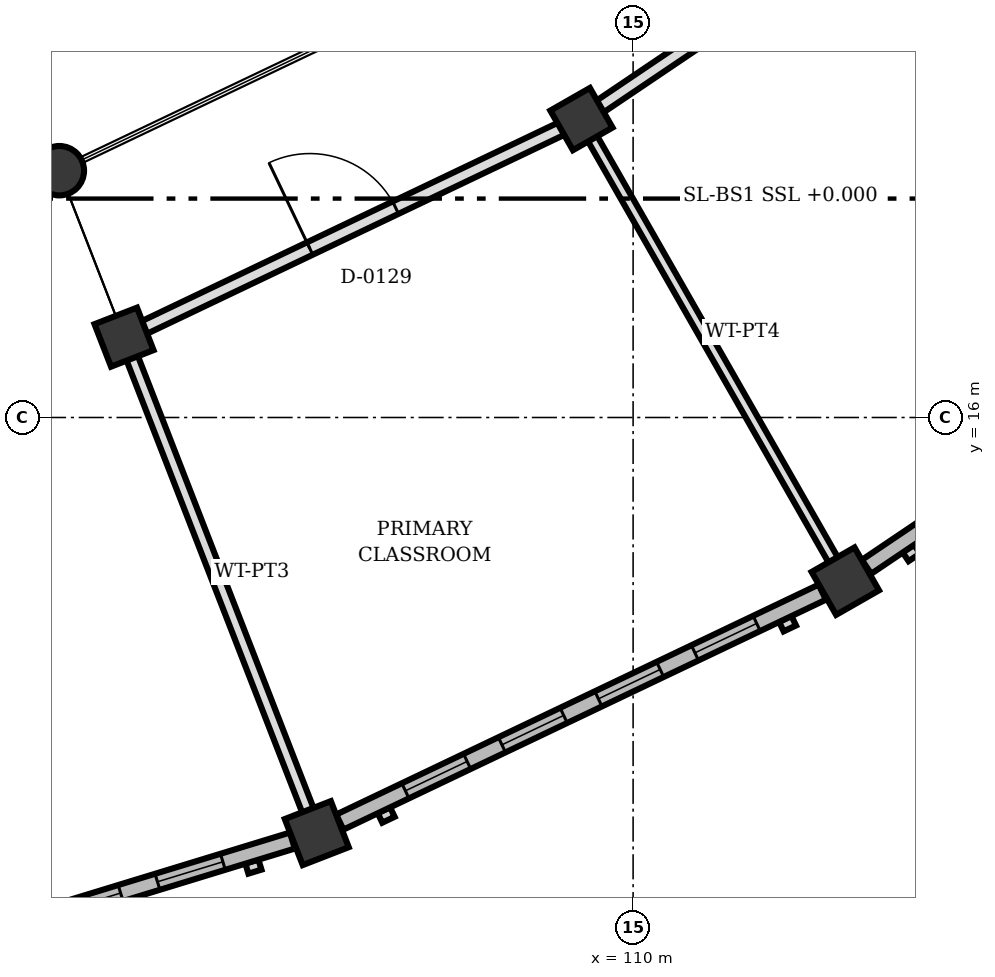
"""IFC4 building model, lengths in metres.
Left out: names, types, materials, properties, quantities, classifications, styles, units other than length and angle.
Written with IfcOpenShell. Run it as: python <this file> out.ifc"""

import sys

from ifc_helpers import new_model, si_unit, direction, frame, frame_2d, origin, origin_2d, place, context, subcontext, project, spatial, rectangle, circle, extrude, element, fill, save


model = new_model("IFC4")
c1 = context("Model", 3, precision=1e-05, world=origin(), true_north=direction((0.0, 1.0)))
c2 = subcontext(c1, "Body", "Model", "MODEL_VIEW")
j1 = project(units=[si_unit("LENGTHUNIT", "METRE"), si_unit("PLANEANGLEUNIT", "RADIAN")], contexts=[c1])
p1 = place(None, origin())
s1 = spatial("IfcSite", under=j1, at=p1, CompositionType="ELEMENT")
p2 = place(p1, origin())
s2 = spatial("IfcBuilding", under=s1, at=p2, CompositionType="ELEMENT")
p3 = place(p2, origin())
s3 = spatial("IfcBuildingStorey", under=s2, at=p3, CompositionType="ELEMENT", Elevation=0.0)
p4 = place(p3, frame((102.451, 19.247, 0.0), z_axis=(0.0, 0.0, 1.0), x_axis=(1.0, 0.0, 0.0)))
e1 = element("IfcColumn", 1, at=p4, inside=s3, PredefinedType="COLUMN", context=c2, shape_type="SweptSolid", body=[
    extrude(circle(Radius=0.325, at=origin_2d()), origin(), (0.0, 0.0, 1.0), 4.5),
])
for number, where, z_axis, x_axis in (
    (2, (103.302, 17.057, 0.0), (0.0, 0.0, 1.0), (0.362, -0.932, 0.0)),
    (3, (109.32, 19.926, 0.0), (0.0, 0.0, 1.0), (0.496, -0.868, 0.0)),
):
    element("IfcColumn", number, at=place(p3, frame(where, z_axis=z_axis, x_axis=x_axis)), inside=s3, PredefinedType="COLUMN", context=c2, shape_type="SweptSolid", body=[
        extrude(rectangle(XDim=0.6, YDim=0.6, at=origin_2d()), origin(), (0.0, 0.0, 1.0), 4.5),
    ])
for number, where, z_axis, x_axis in (
    (4, (105.838, 10.532, 0.0), (0.0, 0.0, 1.0), (0.362, -0.932, 0.0)),
    (5, (112.792, 13.847, 0.0), (0.0, 0.0, 1.0), (0.496, -0.868, 0.0)),
):
    element("IfcColumn", number, at=place(p3, frame(where, z_axis=z_axis, x_axis=x_axis)), inside=s3, PredefinedType="COLUMN", context=c2, shape_type="SweptSolid", body=[
        extrude(rectangle(XDim=0.65, YDim=0.65, at=origin_2d()), origin(), (0.0, 0.0, 1.0), 4.5),
    ])
p5 = place(p3, frame((105.517, 10.434, 0.0), z_axis=(0.0, 0.0, 1.0), x_axis=(-0.956340250866, -0.292255580912, 0.0)))
e6 = element("IfcWall", 6, at=p5, inside=s3, PredefinedType="SOLIDWALL", context=c2, shape_type="SweptSolid", body=[
    extrude(rectangle(XDim=7.032, YDim=0.22, at=frame_2d((3.516, 0.0))), origin(), (0.0, 0.0, 1.0), 3.55),
])
p6 = place(p5, frame((0.956, 0.0, 0.85)))
e7 = element("IfcOpeningElement", 7, at=p6, cuts=e6, PredefinedType="OPENING", context=c2, shape_type="SweptSolid", body=[
    extrude(rectangle(XDim=0.9, YDim=1.4, at=frame_2d((0.45, 0.7))), frame((0.0, 0.12, 0.0), z_axis=(0.0, -1.0, 0.0), x_axis=(1.0, 0.0, 0.0)), (0.0, 0.0, 1.0), 0.24),
])
p7 = place(p5, frame((2.363, 0.0, 0.85)))
e8 = element("IfcOpeningElement", 8, at=p7, cuts=e6, PredefinedType="OPENING", context=c2, shape_type="SweptSolid", body=[
    extrude(rectangle(XDim=0.9, YDim=1.4, at=frame_2d((0.45, 0.7))), frame((0.0, 0.12, 0.0), z_axis=(0.0, -1.0, 0.0), x_axis=(1.0, 0.0, 0.0)), (0.0, 0.0, 1.0), 0.24),
])
p8 = place(p5, frame((3.769, 0.0, 0.85)))
e9 = element("IfcOpeningElement", 9, at=p8, cuts=e6, PredefinedType="OPENING", context=c2, shape_type="SweptSolid", body=[
    extrude(rectangle(XDim=0.9, YDim=1.4, at=frame_2d((0.45, 0.7))), frame((0.0, 0.12, 0.0), z_axis=(0.0, -1.0, 0.0), x_axis=(1.0, 0.0, 0.0)), (0.0, 0.0, 1.0), 0.24),
])
p9 = place(p5, frame((5.176, 0.0, 0.85)))
e10 = element("IfcOpeningElement", 10, at=p9, cuts=e6, PredefinedType="OPENING", context=c2, shape_type="SweptSolid", body=[
    extrude(rectangle(XDim=0.9, YDim=1.4, at=frame_2d((0.45, 0.7))), frame((0.0, 0.12, 0.0), z_axis=(0.0, -1.0, 0.0), x_axis=(1.0, 0.0, 0.0)), (0.0, 0.0, 1.0), 0.24),
])
p10 = place(p3, frame((112.489, 13.702, 0.0), z_axis=(0.0, 0.0, 1.0), x_axis=(-0.902744968073, -0.43017615301, 0.0)))
e11 = element("IfcWall", 11, at=p10, inside=s3, PredefinedType="SOLIDWALL", context=c2, shape_type="SweptSolid", body=[
    extrude(rectangle(XDim=7.032, YDim=0.22, at=frame_2d((3.516, 0.0))), origin(), (0.0, 0.0, 1.0), 3.55),
])
p11 = place(p10, frame((0.956, 0.0, 0.85)))
e12 = element("IfcOpeningElement", 12, at=p11, cuts=e11, PredefinedType="OPENING", context=c2, shape_type="SweptSolid", body=[
    extrude(rectangle(XDim=0.9, YDim=1.4, at=frame_2d((0.45, 0.7))), frame((0.0, 0.12, 0.0), z_axis=(0.0, -1.0, 0.0), x_axis=(1.0, 0.0, 0.0)), (0.0, 0.0, 1.0), 0.24),
])
p12 = place(p10, frame((2.363, 0.0, 0.85)))
e13 = element("IfcOpeningElement", 13, at=p12, cuts=e11, PredefinedType="OPENING", context=c2, shape_type="SweptSolid", body=[
    extrude(rectangle(XDim=0.9, YDim=1.4, at=frame_2d((0.45, 0.7))), frame((0.0, 0.12, 0.0), z_axis=(0.0, -1.0, 0.0), x_axis=(1.0, 0.0, 0.0)), (0.0, 0.0, 1.0), 0.24),
])
p13 = place(p10, frame((3.769, 0.0, 0.85)))
e14 = element("IfcOpeningElement", 14, at=p13, cuts=e11, PredefinedType="OPENING", context=c2, shape_type="SweptSolid", body=[
    extrude(rectangle(XDim=0.9, YDim=1.4, at=frame_2d((0.45, 0.7))), frame((0.0, 0.12, 0.0), z_axis=(0.0, -1.0, 0.0), x_axis=(1.0, 0.0, 0.0)), (0.0, 0.0, 1.0), 0.24),
])
p14 = place(p10, frame((5.176, 0.0, 0.85)))
e15 = element("IfcOpeningElement", 15, at=p14, cuts=e11, PredefinedType="OPENING", context=c2, shape_type="SweptSolid", body=[
    extrude(rectangle(XDim=0.9, YDim=1.4, at=frame_2d((0.45, 0.7))), frame((0.0, 0.12, 0.0), z_axis=(0.0, -1.0, 0.0), x_axis=(1.0, 0.0, 0.0)), (0.0, 0.0, 1.0), 0.24),
])
p15 = place(p3, frame((118.901, 17.965, 0.0), z_axis=(0.0, 0.0, 1.0), x_axis=(-0.829175809129, -0.558987904659, 0.0)))
e16 = element("IfcWall", 16, at=p15, inside=s3, PredefinedType="SOLIDWALL", context=c2, shape_type="SweptSolid", body=[
    extrude(rectangle(XDim=7.031, YDim=0.22, at=frame_2d((3.515, 0.0))), origin(), (0.0, 0.0, 1.0), 3.55),
])
p16 = place(p15, frame((0.956, 0.0, 0.85)))
e17 = element("IfcOpeningElement", 17, at=p16, cuts=e16, PredefinedType="OPENING", context=c2, shape_type="SweptSolid", body=[
    extrude(rectangle(XDim=0.9, YDim=1.4, at=frame_2d((0.45, 0.7))), frame((0.0, 0.12, 0.0), z_axis=(0.0, -1.0, 0.0), x_axis=(1.0, 0.0, 0.0)), (0.0, 0.0, 1.0), 0.24),
])
p17 = place(p15, frame((2.362, 0.0, 0.85)))
e18 = element("IfcOpeningElement", 18, at=p17, cuts=e16, PredefinedType="OPENING", context=c2, shape_type="SweptSolid", body=[
    extrude(rectangle(XDim=0.9, YDim=1.4, at=frame_2d((0.45, 0.7))), frame((0.0, 0.12, 0.0), z_axis=(0.0, -1.0, 0.0), x_axis=(1.0, 0.0, 0.0)), (0.0, 0.0, 1.0), 0.24),
])
p18 = place(p15, frame((3.769, 0.0, 0.85)))
e19 = element("IfcOpeningElement", 19, at=p18, cuts=e16, PredefinedType="OPENING", context=c2, shape_type="SweptSolid", body=[
    extrude(rectangle(XDim=0.9, YDim=1.4, at=frame_2d((0.45, 0.7))), frame((0.0, 0.12, 0.0), z_axis=(0.0, -1.0, 0.0), x_axis=(1.0, 0.0, 0.0)), (0.0, 0.0, 1.0), 0.24),
])
p19 = place(p15, frame((5.175, 0.0, 0.85)))
e20 = element("IfcOpeningElement", 20, at=p19, cuts=e16, PredefinedType="OPENING", context=c2, shape_type="SweptSolid", body=[
    extrude(rectangle(XDim=0.9, YDim=1.4, at=frame_2d((0.45, 0.7))), frame((0.0, 0.12, 0.0), z_axis=(0.0, -1.0, 0.0), x_axis=(1.0, 0.0, 0.0)), (0.0, 0.0, 1.0), 0.24),
])
p20 = place(p3, frame((103.408, 16.785, 0.0), z_axis=(0.0, 0.0, 1.0), x_axis=(0.362166079004, -0.932113582789, 0.0)))
e21 = element("IfcWall", 21, at=p20, inside=s3, PredefinedType="PARTITIONING", context=c2, shape_type="SweptSolid", body=[
    extrude(rectangle(XDim=6.392, YDim=0.16, at=frame_2d((3.196, 0.0))), origin(), (0.0, 0.0, 1.0), 3.572),
])
p21 = place(p3, frame((109.465, 19.672, 0.0), z_axis=(0.0, 0.0, 1.0), x_axis=(0.495957929612, -0.868346550667, 0.0)))
e22 = element("IfcWall", 22, at=p21, inside=s3, PredefinedType="PARTITIONING", context=c2, shape_type="SweptSolid", body=[
    extrude(rectangle(XDim=6.392, YDim=0.14, at=frame_2d((3.196, 0.0))), origin(), (0.0, 0.0, 1.0), 3.572),
])
p22 = place(p3, frame((103.566, 17.183, 0.0), z_axis=(0.0, 0.0, 1.0), x_axis=(0.902690527885, 0.430290379704, 0.0)))
e23 = element("IfcWall", 23, at=p22, inside=s3, PredefinedType="PARTITIONING", context=c2, shape_type="SweptSolid", body=[
    extrude(rectangle(XDim=6.082, YDim=0.18, at=frame_2d((3.041, 0.0))), origin(), (0.0, 0.0, 1.0), 3.572),
])
p23 = place(p22, frame((2.416, 0.0, 0.0)))
e24 = element("IfcOpeningElement", 24, at=p23, cuts=e23, PredefinedType="OPENING", context=c2, shape_type="SweptSolid", body=[
    extrude(rectangle(XDim=1.25, YDim=2.2, at=frame_2d((0.625, 1.1))), frame((0.0, 0.1, 0.0), z_axis=(0.0, -1.0, 0.0), x_axis=(1.0, 0.0, 0.0)), (0.0, 0.0, 1.0), 0.2),
])
p24 = place(p3, frame((109.563, 20.09, 0.0), z_axis=(0.0, 0.0, 1.0), x_axis=(0.829259954876, 0.558863066626, 0.0)))
e25 = element("IfcWall", 25, at=p24, inside=s3, PredefinedType="PARTITIONING", context=c2, shape_type="SweptSolid", body=[
    extrude(rectangle(XDim=6.08, YDim=0.18, at=frame_2d((3.04, 0.0))), origin(), (0.0, 0.0, 1.0), 3.572),
])
p25 = place(p24, frame((2.265, 0.0, 0.0)))
e26 = element("IfcOpeningElement", 26, at=p25, cuts=e25, PredefinedType="OPENING", context=c2, shape_type="SweptSolid", body=[
    extrude(rectangle(XDim=1.55, YDim=2.2, at=frame_2d((0.775, 1.1))), frame((0.0, 0.1, 0.0), z_axis=(0.0, -1.0, 0.0), x_axis=(1.0, 0.0, 0.0)), (0.0, 0.0, 1.0), 0.2),
])
p26 = place(p6, origin())
e27 = element("IfcWindow", 27, at=p26, inside=s3, PartitioningType="SINGLE_PANEL", PredefinedType="WINDOW", context=c2, shape_type="SweptSolid", body=[
    extrude(rectangle(XDim=0.9, YDim=1.4, at=frame_2d((0.45, 0.7))), frame((0.0, 0.03, 0.0), z_axis=(0.0, -1.0, 0.0), x_axis=(1.0, 0.0, 0.0)), (0.0, 0.0, 1.0), 0.06),
])
fill(e7, e27)
p27 = place(p7, origin())
e28 = element("IfcWindow", 28, at=p27, inside=s3, PartitioningType="SINGLE_PANEL", PredefinedType="WINDOW", context=c2, shape_type="SweptSolid", body=[
    extrude(rectangle(XDim=0.9, YDim=1.4, at=frame_2d((0.45, 0.7))), frame((0.0, 0.03, 0.0), z_axis=(0.0, -1.0, 0.0), x_axis=(1.0, 0.0, 0.0)), (0.0, 0.0, 1.0), 0.06),
])
fill(e8, e28)
p28 = place(p11, origin())
e29 = element("IfcWindow", 29, at=p28, inside=s3, PartitioningType="SINGLE_PANEL", PredefinedType="WINDOW", context=c2, shape_type="SweptSolid", body=[
    extrude(rectangle(XDim=0.9, YDim=1.4, at=frame_2d((0.45, 0.7))), frame((0.0, 0.03, 0.0), z_axis=(0.0, -1.0, 0.0), x_axis=(1.0, 0.0, 0.0)), (0.0, 0.0, 1.0), 0.06),
])
fill(e12, e29)
p29 = place(p12, origin())
e30 = element("IfcWindow", 30, at=p29, inside=s3, PartitioningType="SINGLE_PANEL", PredefinedType="WINDOW", context=c2, shape_type="SweptSolid", body=[
    extrude(rectangle(XDim=0.9, YDim=1.4, at=frame_2d((0.45, 0.7))), frame((0.0, 0.03, 0.0), z_axis=(0.0, -1.0, 0.0), x_axis=(1.0, 0.0, 0.0)), (0.0, 0.0, 1.0), 0.06),
])
fill(e13, e30)
p30 = place(p13, origin())
e31 = element("IfcWindow", 31, at=p30, inside=s3, PartitioningType="SINGLE_PANEL", PredefinedType="WINDOW", context=c2, shape_type="SweptSolid", body=[
    extrude(rectangle(XDim=0.9, YDim=1.4, at=frame_2d((0.45, 0.7))), frame((0.0, 0.03, 0.0), z_axis=(0.0, -1.0, 0.0), x_axis=(1.0, 0.0, 0.0)), (0.0, 0.0, 1.0), 0.06),
])
fill(e14, e31)
p31 = place(p14, origin())
e32 = element("IfcWindow", 32, at=p31, inside=s3, PartitioningType="SINGLE_PANEL", PredefinedType="WINDOW", context=c2, shape_type="SweptSolid", body=[
    extrude(rectangle(XDim=0.9, YDim=1.4, at=frame_2d((0.45, 0.7))), frame((0.0, 0.03, 0.0), z_axis=(0.0, -1.0, 0.0), x_axis=(1.0, 0.0, 0.0)), (0.0, 0.0, 1.0), 0.06),
])
fill(e15, e32)
p32 = place(p23, origin())
e33 = element("IfcDoor", 33, at=p32, inside=s3, OperationType="SINGLE_SWING_LEFT", PredefinedType="DOOR", context=c2, shape_type="SweptSolid", body=[
    extrude(rectangle(XDim=1.25, YDim=2.2, at=frame_2d((0.625, 1.1))), frame((0.0, 0.025, 0.0), z_axis=(0.0, -1.0, 0.0), x_axis=(1.0, 0.0, 0.0)), (0.0, 0.0, 1.0), 0.05),
])
fill(e24, e33)
save(model, sys.argv[1])
